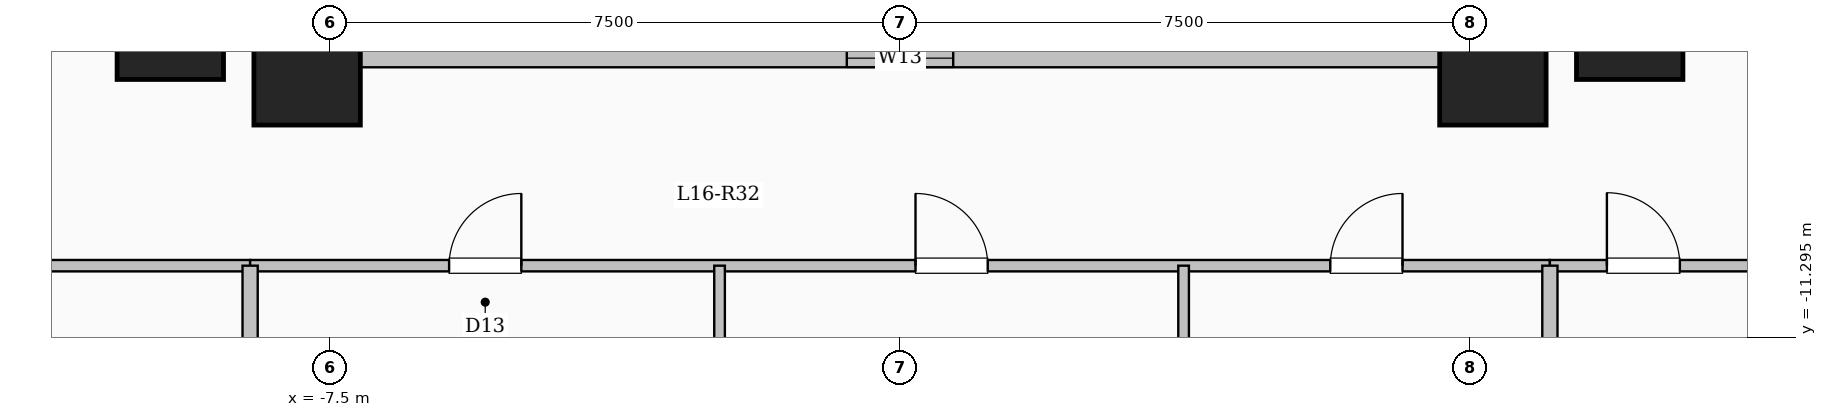
"""IFC4 building model, lengths in metres.
Left out: names, types, materials, properties, quantities, classifications, styles, units other than length and angle.
Written with IfcOpenShell. Run it as: python <this file> out.ifc"""

import sys

from ifc_helpers import new_model, si_unit, direction, frame, frame_2d, origin, origin_2d, place, context, subcontext, project, spatial, rectangle, extrude, element, fill, save


model = new_model("IFC4")
c1 = context("Model", 3, precision=1e-05, world=origin(), true_north=direction((0.0, 1.0)))
c2 = subcontext(c1, "Body", "Model", "MODEL_VIEW")
j1 = project(units=[si_unit("LENGTHUNIT", "METRE"), si_unit("PLANEANGLEUNIT", "RADIAN")], contexts=[c1])
p1 = place(None, origin())
s1 = spatial("IfcSite", under=j1, at=p1, CompositionType="ELEMENT")
p2 = place(p1, origin())
s2 = spatial("IfcBuilding", under=s1, at=p2, CompositionType="ELEMENT")
p3 = place(p2, frame((0.0, 0.0, 60.85)))
s3 = spatial("IfcBuildingStorey", under=s2, at=p3, CompositionType="ELEMENT", Elevation=60.85)
for number, where, z_axis, x_axis in (
    (1, (-7.8, -7.8, 0.0), (0.0, 0.0, 1.0), (1.0, 0.0, 0.0)),
    (2, (7.8, -7.8, 0.0), (0.0, 0.0, 1.0), (1.0, 0.0, 0.0)),
    (3, (-9.6, -7.2, 0.0), (0.0, 0.0, 1.0), (1.0, 0.0, 0.0)),
    (4, (9.6, -7.2, 0.0), (0.0, 0.0, 1.0), (1.0, 0.0, 0.0)),
):
    element("IfcColumn", number, at=place(p3, frame(where, z_axis=z_axis, x_axis=x_axis)), inside=s3, PredefinedType="COLUMN", context=c2, shape_type="SweptSolid", body=[
        extrude(rectangle(XDim=1.4, YDim=1.4, at=origin_2d()), origin(), (0.0, 0.0, 1.0), 3.35),
    ])
p4 = place(p3, frame((-7.62, -7.62, 0.0), z_axis=(0.0, 0.0, 1.0), x_axis=(1.0, 0.0, 0.0)))
e5 = element("IfcWall", 5, at=p4, inside=s3, PredefinedType="SOLIDWALL", context=c2, shape_type="SweptSolid", body=[
    extrude(rectangle(XDim=15.24, YDim=0.24, at=frame_2d((7.62, 0.0))), origin(), (0.0, 0.0, 1.0), 3.05),
])
p5 = place(p4, frame((6.92, 0.0, 0.95)))
e6 = element("IfcOpeningElement", 6, at=p5, cuts=e5, PredefinedType="OPENING", context=c2, shape_type="SweptSolid", body=[
    extrude(rectangle(XDim=1.4, YDim=1.5, at=frame_2d((0.7, 0.75))), frame((0.0, 0.13, 0.0), z_axis=(0.0, -1.0, 0.0), x_axis=(1.0, 0.0, 0.0)), (0.0, 0.0, 1.0), 0.26),
])
p6 = place(p3, frame((7.62, -7.62, 0.0), z_axis=(0.0, 0.0, 1.0), x_axis=(0.0, 1.0, 0.0)))
e7 = element("IfcWall", 7, at=p6, inside=s3, PredefinedType="SOLIDWALL", context=c2, shape_type="SweptSolid", body=[
    extrude(rectangle(XDim=15.24, YDim=0.24, at=frame_2d((7.62, 0.0))), origin(), (0.0, 0.0, 1.0), 3.05),
])
p7 = place(p6, frame((6.92, 0.0, 0.95)))
e8 = element("IfcOpeningElement", 8, at=p7, cuts=e7, PredefinedType="OPENING", context=c2, shape_type="SweptSolid", body=[
    extrude(rectangle(XDim=1.4, YDim=1.5, at=frame_2d((0.7, 0.75))), frame((0.0, 0.13, 0.0), z_axis=(0.0, -1.0, 0.0), x_axis=(1.0, 0.0, 0.0)), (0.0, 0.0, 1.0), 0.26),
])
p8 = place(p3, frame((-7.62, 7.62, 0.0), z_axis=(0.0, 0.0, 1.0), x_axis=(0.0, -1.0, 0.0)))
e9 = element("IfcWall", 9, at=p8, inside=s3, PredefinedType="SOLIDWALL", context=c2, shape_type="SweptSolid", body=[
    extrude(rectangle(XDim=15.24, YDim=0.24, at=frame_2d((7.62, 0.0))), origin(), (0.0, 0.0, 1.0), 3.05),
])
p9 = place(p8, frame((6.92, 0.0, 0.95)))
e10 = element("IfcOpeningElement", 10, at=p9, cuts=e9, PredefinedType="OPENING", context=c2, shape_type="SweptSolid", body=[
    extrude(rectangle(XDim=1.4, YDim=1.5, at=frame_2d((0.7, 0.75))), frame((0.0, 0.13, 0.0), z_axis=(0.0, -1.0, 0.0), x_axis=(1.0, 0.0, 0.0)), (0.0, 0.0, 1.0), 0.26),
])
p10 = place(p3, frame((-22.55, -10.35, 0.0), z_axis=(0.0, 0.0, 1.0), x_axis=(1.0, 0.0, 0.0)))
e11 = element("IfcWall", 11, at=p10, inside=s3, PredefinedType="PARTITIONING", context=c2, shape_type="SweptSolid", body=[
    extrude(rectangle(XDim=14.0, YDim=0.15, at=frame_2d((7.0, 0.0))), origin(), (0.0, 0.0, 1.0), 3.05),
])
p11 = place(p10, frame((0.7, 0.0, 0.0)))
e12 = element("IfcOpeningElement", 12, at=p11, cuts=e11, PredefinedType="OPENING", context=c2, shape_type="SweptSolid", body=[
    extrude(rectangle(XDim=0.96, YDim=2.15, at=frame_2d((0.48, 1.075))), frame((0.0, 0.085, 0.0), z_axis=(0.0, -1.0, 0.0), x_axis=(1.0, 0.0, 0.0)), (0.0, 0.0, 1.0), 0.17),
])
p12 = place(p3, frame((-8.55, -10.35, 0.0), z_axis=(0.0, 0.0, 1.0), x_axis=(1.0, 0.0, 0.0)))
e13 = element("IfcWall", 13, at=p12, inside=s3, PredefinedType="PARTITIONING", context=c2, shape_type="SweptSolid", body=[
    extrude(rectangle(XDim=17.1, YDim=0.15, at=frame_2d((8.55, 0.0))), origin(), (0.0, 0.0, 1.0), 3.05),
])
p13 = place(p12, frame((2.618, 0.0, 0.0)))
e14 = element("IfcOpeningElement", 14, at=p13, cuts=e13, PredefinedType="OPENING", context=c2, shape_type="SweptSolid", body=[
    extrude(rectangle(XDim=0.95, YDim=2.15, at=frame_2d((0.475, 1.075))), frame((0.0, 0.085, 0.0), z_axis=(0.0, -1.0, 0.0), x_axis=(1.0, 0.0, 0.0)), (0.0, 0.0, 1.0), 0.17),
])
p14 = place(p12, frame((8.754, 0.0, 0.0)))
e15 = element("IfcOpeningElement", 15, at=p14, cuts=e13, PredefinedType="OPENING", context=c2, shape_type="SweptSolid", body=[
    extrude(rectangle(XDim=0.95, YDim=2.15, at=frame_2d((0.475, 1.075))), frame((0.0, 0.085, 0.0), z_axis=(0.0, -1.0, 0.0), x_axis=(1.0, 0.0, 0.0)), (0.0, 0.0, 1.0), 0.17),
])
p15 = place(p12, frame((14.211, 0.0, 0.0)))
e16 = element("IfcOpeningElement", 16, at=p15, cuts=e13, PredefinedType="OPENING", context=c2, shape_type="SweptSolid", body=[
    extrude(rectangle(XDim=0.95, YDim=2.15, at=frame_2d((0.475, 1.075))), frame((0.0, 0.085, 0.0), z_axis=(0.0, -1.0, 0.0), x_axis=(1.0, 0.0, 0.0)), (0.0, 0.0, 1.0), 0.17),
])
p16 = place(p3, frame((8.55, -10.35, 0.0), z_axis=(0.0, 0.0, 1.0), x_axis=(1.0, 0.0, 0.0)))
e17 = element("IfcWall", 17, at=p16, inside=s3, PredefinedType="PARTITIONING", context=c2, shape_type="SweptSolid", body=[
    extrude(rectangle(XDim=14.0, YDim=0.15, at=frame_2d((7.0, 0.0))), origin(), (0.0, 0.0, 1.0), 3.05),
])
p17 = place(p16, frame((0.75, 0.0, 0.0)))
e18 = element("IfcOpeningElement", 18, at=p17, cuts=e17, PredefinedType="OPENING", context=c2, shape_type="SweptSolid", body=[
    extrude(rectangle(XDim=0.96, YDim=2.15, at=frame_2d((0.48, 1.075))), frame((0.0, 0.085, 0.0), z_axis=(0.0, -1.0, 0.0), x_axis=(1.0, 0.0, 0.0)), (0.0, 0.0, 1.0), 0.17),
])
for number, where, z_axis, x_axis in (
    (19, (-8.55, -24.204, 0.0), (0.0, 0.0, 1.0), (0.0, 1.0, 0.0)),
    (20, (8.55, -24.204, 0.0), (0.0, 0.0, 1.0), (0.0, 1.0, 0.0)),
):
    element("IfcWall", number, at=place(p3, frame(where, z_axis=z_axis, x_axis=x_axis)), inside=s3, PredefinedType="SOLIDWALL", context=c2, shape_type="SweptSolid", body=[
        extrude(rectangle(XDim=13.854, YDim=0.2, at=frame_2d((6.927, 0.0))), origin(), (0.0, 0.0, 1.0), 3.05),
    ])
for number, where, z_axis, x_axis in (
    (21, (-2.374, -23.55, 0.0), (0.0, 0.0, 1.0), (0.0, 1.0, 0.0)),
    (22, (3.731, -23.55, 0.0), (0.0, 0.0, 1.0), (0.0, 1.0, 0.0)),
):
    element("IfcWall", number, at=place(p3, frame(where, z_axis=z_axis, x_axis=x_axis)), inside=s3, PredefinedType="PARTITIONING", context=c2, shape_type="SweptSolid", body=[
        extrude(rectangle(XDim=13.2, YDim=0.14, at=frame_2d((6.6, 0.0))), origin(), (0.0, 0.0, 1.0), 3.05),
    ])
p18 = place(p5, origin())
e23 = element("IfcWindow", 23, at=p18, inside=s3, PartitioningType="SINGLE_PANEL", PredefinedType="WINDOW", context=c2, shape_type="SweptSolid", body=[
    extrude(rectangle(XDim=1.4, YDim=1.5, at=frame_2d((0.7, 0.75))), frame((0.0, 0.03, 0.0), z_axis=(0.0, -1.0, 0.0), x_axis=(1.0, 0.0, 0.0)), (0.0, 0.0, 1.0), 0.06),
])
fill(e6, e23)
p19 = place(p17, origin())
e24 = element("IfcDoor", 24, at=p19, inside=s3, OperationType="SINGLE_SWING_LEFT", PredefinedType="DOOR", context=c2, shape_type="SweptSolid", body=[
    extrude(rectangle(XDim=0.96, YDim=2.15, at=frame_2d((0.48, 1.075))), frame((0.0, 0.025, 0.0), z_axis=(0.0, -1.0, 0.0), x_axis=(1.0, 0.0, 0.0)), (0.0, 0.0, 1.0), 0.05),
])
fill(e18, e24)
p20 = place(p13, origin())
e25 = element("IfcDoor", 25, at=p20, inside=s3, OperationType="SINGLE_SWING_RIGHT", PredefinedType="DOOR", context=c2, shape_type="SweptSolid", body=[
    extrude(rectangle(XDim=0.95, YDim=2.15, at=frame_2d((0.475, 1.075))), frame((0.0, 0.025, 0.0), z_axis=(0.0, -1.0, 0.0), x_axis=(1.0, 0.0, 0.0)), (0.0, 0.0, 1.0), 0.05),
])
fill(e14, e25)
p21 = place(p14, origin())
e26 = element("IfcDoor", 26, at=p21, inside=s3, OperationType="SINGLE_SWING_LEFT", PredefinedType="DOOR", context=c2, shape_type="SweptSolid", body=[
    extrude(rectangle(XDim=0.95, YDim=2.15, at=frame_2d((0.475, 1.075))), frame((0.0, 0.025, 0.0), z_axis=(0.0, -1.0, 0.0), x_axis=(1.0, 0.0, 0.0)), (0.0, 0.0, 1.0), 0.05),
])
fill(e15, e26)
p22 = place(p15, origin())
e27 = element("IfcDoor", 27, at=p22, inside=s3, OperationType="SINGLE_SWING_RIGHT", PredefinedType="DOOR", context=c2, shape_type="SweptSolid", body=[
    extrude(rectangle(XDim=0.95, YDim=2.15, at=frame_2d((0.475, 1.075))), frame((0.0, 0.025, 0.0), z_axis=(0.0, -1.0, 0.0), x_axis=(1.0, 0.0, 0.0)), (0.0, 0.0, 1.0), 0.05),
])
fill(e16, e27)
save(model, sys.argv[1])
